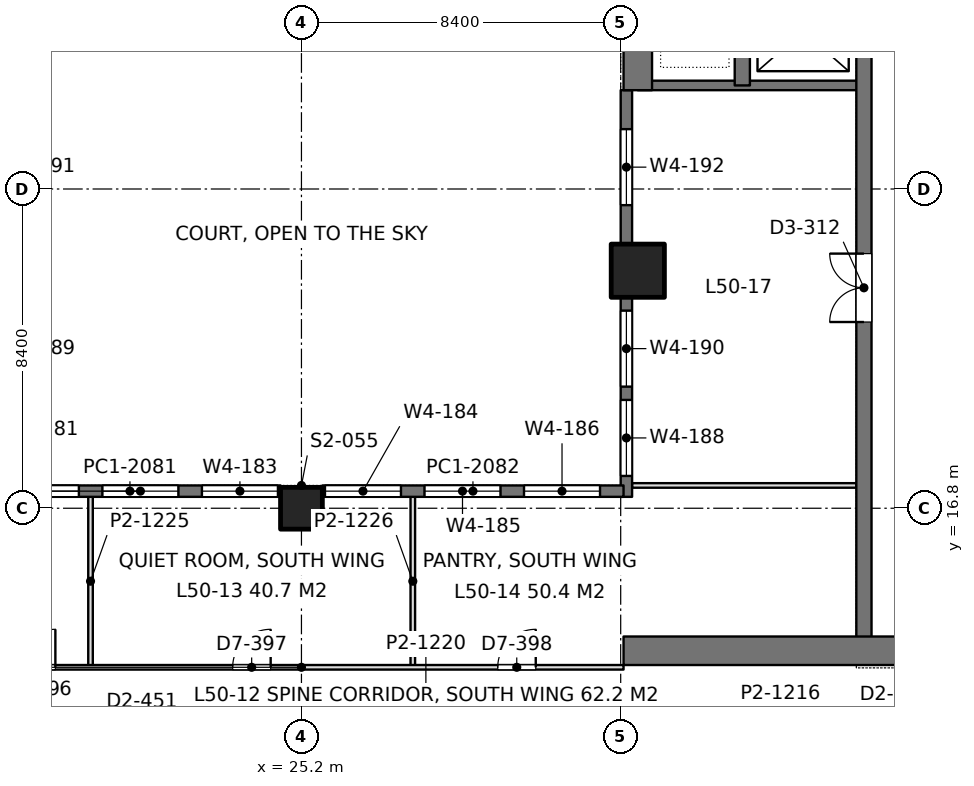
"""IFC4 building model, lengths in metres.
Left out: names, types, materials, properties, quantities, classifications, styles, units other than length and angle.
Written with IfcOpenShell. Run it as: python <this file> out.ifc"""

import sys

from ifc_helpers import new_model, si_unit, direction, frame, frame_2d, origin, origin_2d, place, context, subcontext, project, spatial, rectangle, extrude, element, fill, save


model = new_model("IFC4")
c1 = context("Model", 3, precision=1e-05, world=origin(), true_north=direction((0.0, 1.0)))
c2 = subcontext(c1, "Body", "Model", "MODEL_VIEW")
j1 = project(units=[si_unit("LENGTHUNIT", "METRE"), si_unit("PLANEANGLEUNIT", "RADIAN")], contexts=[c1])
p1 = place(None, origin())
s1 = spatial("IfcSite", under=j1, at=p1, CompositionType="ELEMENT")
p2 = place(p1, origin())
s2 = spatial("IfcBuilding", under=s1, at=p2, CompositionType="ELEMENT")
p3 = place(p2, frame((0.0, 0.0, 219.6)))
s3 = spatial("IfcBuildingStorey", under=s2, at=p3, CompositionType="ELEMENT", Elevation=219.6)
p4 = place(p3, frame((25.2, 16.8, 0.0), z_axis=(0.0, 0.0, 1.0), x_axis=(1.0, 0.0, 0.0)))
e1 = element("IfcColumn", 1, at=p4, inside=s3, PredefinedType="COLUMN", context=c2, shape_type="SweptSolid", body=[
    extrude(rectangle(XDim=1.1, YDim=1.1, at=origin_2d()), origin(), (0.0, 0.0, 1.0), 4.2),
])
p5 = place(p3, frame((34.05, 23.05, 0.0), z_axis=(0.0, 0.0, 1.0), x_axis=(1.0, 0.0, 0.0)))
e2 = element("IfcColumn", 2, at=p5, inside=s3, PredefinedType="COLUMN", context=c2, shape_type="SweptSolid", body=[
    extrude(rectangle(XDim=1.4, YDim=1.4, at=origin_2d()), origin(), (0.0, 0.0, 1.0), 4.2),
])
p6 = place(p3, frame((33.675, 13.05, 0.0), z_axis=(0.0, 0.0, 1.0), x_axis=(1.0, 0.0, 0.0)))
e3 = element("IfcWall", 3, at=p6, inside=s3, PredefinedType="SHEAR", context=c2, shape_type="SweptSolid", body=[
    extrude(rectangle(XDim=17.85, YDim=0.75, at=frame_2d((8.925, 0.0))), origin(), (0.0, 0.0, 1.0), 4.2),
])
p7 = place(p6, frame((7.175, 0.0, 0.0)))
e4 = element("IfcOpeningElement", 4, at=p7, cuts=e3, PredefinedType="OPENING", context=c2, shape_type="SweptSolid", body=[
    extrude(rectangle(XDim=1.8, YDim=2.4, at=frame_2d((0.9, 1.2))), frame((0.0, 0.385, 0.0), z_axis=(0.0, -1.0, 0.0), x_axis=(1.0, 0.0, 0.0)), (0.0, 0.0, 1.0), 0.77),
])
p8 = place(p3, frame((34.05, 27.8, 0.0), z_axis=(0.0, 0.0, 1.0), x_axis=(0.0, 1.0, 0.0)))
e5 = element("IfcWall", 5, at=p8, inside=s3, PredefinedType="SHEAR", context=c2, shape_type="SweptSolid", body=[
    extrude(rectangle(XDim=9.55, YDim=0.75, at=frame_2d((4.775, 0.0))), origin(), (0.0, 0.0, 1.0), 4.2),
])
p9 = place(p3, frame((40.0, 13.05, 0.0), z_axis=(0.0, 0.0, 1.0), x_axis=(0.0, 1.0, 0.0)))
e6 = element("IfcWall", 6, at=p9, inside=s3, PredefinedType="SHEAR", context=c2, shape_type="SweptSolid", body=[
    extrude(rectangle(XDim=24.3, YDim=0.4, at=frame_2d((12.15, 0.0))), origin(), (0.0, 0.0, 1.0), 4.2),
])
p10 = place(p9, frame((15.75, 0.0, 0.0)))
e7 = element("IfcOpeningElement", 7, at=p10, cuts=e6, PredefinedType="OPENING", context=c2, shape_type="SweptSolid", body=[
    extrude(rectangle(XDim=1.1, YDim=2.2, at=frame_2d((0.55, 1.1))), frame((0.0, 0.21, 0.0), z_axis=(0.0, -1.0, 0.0), x_axis=(1.0, 0.0, 0.0)), (0.0, 0.0, 1.0), 0.42),
])
p11 = place(p9, frame((18.6, 0.0, 0.0)))
e8 = element("IfcOpeningElement", 8, at=p11, cuts=e6, PredefinedType="OPENING", context=c2, shape_type="SweptSolid", body=[
    extrude(rectangle(XDim=1.1, YDim=2.2, at=frame_2d((0.55, 1.1))), frame((0.0, 0.21, 0.0), z_axis=(0.0, -1.0, 0.0), x_axis=(1.0, 0.0, 0.0)), (0.0, 0.0, 1.0), 0.42),
])
p12 = place(p9, frame((21.45, 0.0, 0.0)))
e9 = element("IfcOpeningElement", 9, at=p12, cuts=e6, PredefinedType="OPENING", context=c2, shape_type="SweptSolid", body=[
    extrude(rectangle(XDim=1.1, YDim=2.2, at=frame_2d((0.55, 1.1))), frame((0.0, 0.21, 0.0), z_axis=(0.0, -1.0, 0.0), x_axis=(1.0, 0.0, 0.0)), (0.0, 0.0, 1.0), 0.42),
])
p13 = place(p9, frame((8.65, 0.0, 0.0)))
e10 = element("IfcOpeningElement", 10, at=p13, cuts=e6, PredefinedType="OPENING", context=c2, shape_type="SweptSolid", body=[
    extrude(rectangle(XDim=1.8, YDim=2.4, at=frame_2d((0.9, 1.2))), frame((0.0, 0.21, 0.0), z_axis=(0.0, -1.0, 0.0), x_axis=(1.0, 0.0, 0.0)), (0.0, 0.0, 1.0), 0.42),
])
p14 = place(p3, frame((36.8, 27.925, 0.0), z_axis=(0.0, 0.0, 1.0), x_axis=(0.0, 1.0, 0.0)))
e11 = element("IfcWall", 11, at=p14, inside=s3, PredefinedType="SHEAR", context=c2, shape_type="SweptSolid", body=[
    extrude(rectangle(XDim=9.425, YDim=0.4, at=frame_2d((4.712, 0.0))), origin(), (0.0, 0.0, 1.0), 4.2),
])
p15 = place(p3, frame((40.0, 27.925, 0.0), z_axis=(0.0, 0.0, 1.0), x_axis=(-1.0, 0.0, 0.0)))
e12 = element("IfcWall", 12, at=p15, inside=s3, PredefinedType="SHEAR", context=c2, shape_type="SweptSolid", body=[
    extrude(rectangle(XDim=5.95, YDim=0.25, at=frame_2d((2.975, 0.0))), origin(), (0.0, 0.0, 1.0), 4.2),
])
p16 = place(p3, frame((33.75, 17.1, 0.0), z_axis=(0.0, 0.0, 1.0), x_axis=(0.0, 1.0, 0.0)))
e13 = element("IfcWall", 13, at=p16, inside=s3, PredefinedType="SOLIDWALL", context=c2, shape_type="SweptSolid", body=[
    extrude(rectangle(XDim=10.7, YDim=0.3, at=frame_2d((5.35, 0.0))), origin(), (0.0, 0.0, 1.0), 4.05),
])
p17 = place(p16, frame((0.55, 0.0, 0.9)))
e14 = element("IfcOpeningElement", 14, at=p17, cuts=e13, PredefinedType="OPENING", context=c2, shape_type="SweptSolid", body=[
    extrude(rectangle(XDim=2.0, YDim=1.9, at=frame_2d((1.0, 0.95))), frame((0.0, 0.16, 0.0), z_axis=(0.0, -1.0, 0.0), x_axis=(1.0, 0.0, 0.0)), (0.0, 0.0, 1.0), 0.32),
])
p18 = place(p16, frame((2.9, 0.0, 0.9)))
e15 = element("IfcOpeningElement", 15, at=p18, cuts=e13, PredefinedType="OPENING", context=c2, shape_type="SweptSolid", body=[
    extrude(rectangle(XDim=2.0, YDim=1.9, at=frame_2d((1.0, 0.95))), frame((0.0, 0.16, 0.0), z_axis=(0.0, -1.0, 0.0), x_axis=(1.0, 0.0, 0.0)), (0.0, 0.0, 1.0), 0.32),
])
p19 = place(p16, frame((7.675, 0.0, 0.9)))
e16 = element("IfcOpeningElement", 16, at=p19, cuts=e13, PredefinedType="OPENING", context=c2, shape_type="SweptSolid", body=[
    extrude(rectangle(XDim=2.0, YDim=1.9, at=frame_2d((1.0, 0.95))), frame((0.0, 0.16, 0.0), z_axis=(0.0, -1.0, 0.0), x_axis=(1.0, 0.0, 0.0)), (0.0, 0.0, 1.0), 0.32),
])
p20 = place(p3, frame((16.725, 17.25, 0.0), z_axis=(0.0, 0.0, 1.0), x_axis=(1.0, 0.0, 0.0)))
e17 = element("IfcWall", 17, at=p20, inside=s3, PredefinedType="SOLIDWALL", context=c2, shape_type="SweptSolid", body=[
    extrude(rectangle(XDim=7.925, YDim=0.3, at=frame_2d((3.962, 0.0))), origin(), (0.0, 0.0, 1.0), 4.05),
])
p21 = place(p20, frame((0.619, 0.0, 0.9)))
e18 = element("IfcOpeningElement", 18, at=p21, cuts=e17, PredefinedType="OPENING", context=c2, shape_type="SweptSolid", body=[
    extrude(rectangle(XDim=2.0, YDim=1.9, at=frame_2d((1.0, 0.95))), frame((0.0, 0.16, 0.0), z_axis=(0.0, -1.0, 0.0), x_axis=(1.0, 0.0, 0.0)), (0.0, 0.0, 1.0), 0.32),
])
p22 = place(p20, frame((3.238, 0.0, 0.9)))
e19 = element("IfcOpeningElement", 19, at=p22, cuts=e17, PredefinedType="OPENING", context=c2, shape_type="SweptSolid", body=[
    extrude(rectangle(XDim=2.0, YDim=1.9, at=frame_2d((1.0, 0.95))), frame((0.0, 0.16, 0.0), z_axis=(0.0, -1.0, 0.0), x_axis=(1.0, 0.0, 0.0)), (0.0, 0.0, 1.0), 0.32),
])
p23 = place(p20, frame((5.856, 0.0, 0.9)))
e20 = element("IfcOpeningElement", 20, at=p23, cuts=e17, PredefinedType="OPENING", context=c2, shape_type="SweptSolid", body=[
    extrude(rectangle(XDim=2.0, YDim=1.9, at=frame_2d((1.0, 0.95))), frame((0.0, 0.16, 0.0), z_axis=(0.0, -1.0, 0.0), x_axis=(1.0, 0.0, 0.0)), (0.0, 0.0, 1.0), 0.32),
])
p24 = place(p3, frame((25.75, 17.25, 0.0), z_axis=(0.0, 0.0, 1.0), x_axis=(1.0, 0.0, 0.0)))
e21 = element("IfcWall", 21, at=p24, inside=s3, PredefinedType="SOLIDWALL", context=c2, shape_type="SweptSolid", body=[
    extrude(rectangle(XDim=7.925, YDim=0.3, at=frame_2d((3.962, 0.0))), origin(), (0.0, 0.0, 1.0), 4.05),
])
p25 = place(p24, frame((0.069, 0.0, 0.9)))
e22 = element("IfcOpeningElement", 22, at=p25, cuts=e21, PredefinedType="OPENING", context=c2, shape_type="SweptSolid", body=[
    extrude(rectangle(XDim=2.0, YDim=1.9, at=frame_2d((1.0, 0.95))), frame((0.0, 0.16, 0.0), z_axis=(0.0, -1.0, 0.0), x_axis=(1.0, 0.0, 0.0)), (0.0, 0.0, 1.0), 0.32),
])
p26 = place(p24, frame((2.688, 0.0, 0.9)))
e23 = element("IfcOpeningElement", 23, at=p26, cuts=e21, PredefinedType="OPENING", context=c2, shape_type="SweptSolid", body=[
    extrude(rectangle(XDim=2.0, YDim=1.9, at=frame_2d((1.0, 0.95))), frame((0.0, 0.16, 0.0), z_axis=(0.0, -1.0, 0.0), x_axis=(1.0, 0.0, 0.0)), (0.0, 0.0, 1.0), 0.32),
])
p27 = place(p24, frame((5.306, 0.0, 0.9)))
e24 = element("IfcOpeningElement", 24, at=p27, cuts=e21, PredefinedType="OPENING", context=c2, shape_type="SweptSolid", body=[
    extrude(rectangle(XDim=2.0, YDim=1.9, at=frame_2d((1.0, 0.95))), frame((0.0, 0.16, 0.0), z_axis=(0.0, -1.0, 0.0), x_axis=(1.0, 0.0, 0.0)), (0.0, 0.0, 1.0), 0.32),
])
p28 = place(p3, frame((33.898, 17.4, 0.0), z_axis=(0.0, 0.0, 1.0), x_axis=(1.0, 0.0, 0.0)))
e25 = element("IfcWall", 25, at=p28, inside=s3, PredefinedType="PARTITIONING", context=c2, shape_type="SweptSolid", body=[
    extrude(rectangle(XDim=5.904, YDim=0.12, at=frame_2d((2.952, 0.0))), origin(), (0.0, 0.0, 1.0), 3.55),
])
for number, where, z_axis, x_axis in (
    (26, (19.65, 12.658, 0.0), (0.0, 0.0, 1.0), (0.0, 1.0, 0.0)),
    (27, (28.13, 12.658, 0.0), (0.0, 0.0, 1.0), (0.0, 1.0, 0.0)),
):
    element("IfcWall", number, at=place(p3, frame(where, z_axis=z_axis, x_axis=x_axis)), inside=s3, PredefinedType="PARTITIONING", context=c2, shape_type="SweptSolid", body=[
        extrude(rectangle(XDim=4.444, YDim=0.12, at=frame_2d((2.222, 0.0))), origin(), (0.0, 0.0, 1.0), 3.36),
    ])
p29 = place(p3, frame((16.725, 12.615, 0.0), z_axis=(0.0, 0.0, 1.0), x_axis=(1.0, 0.0, 0.0)))
e28 = element("IfcWall", 28, at=p29, inside=s3, PredefinedType="PARTITIONING", context=c2, shape_type="SweptSolid", body=[
    extrude(rectangle(XDim=16.95, YDim=0.12, at=frame_2d((8.475, 0.0))), origin(), (0.0, 0.0, 1.0), 3.55),
])
p30 = place(p29, frame((1.0, 0.0, 0.0)))
e29 = element("IfcOpeningElement", 29, at=p30, cuts=e28, PredefinedType="OPENING", context=c2, shape_type="SweptSolid", body=[
    extrude(rectangle(XDim=1.0, YDim=2.4, at=frame_2d((0.5, 1.2))), frame((0.0, 0.07, 0.0), z_axis=(0.0, -1.0, 0.0), x_axis=(1.0, 0.0, 0.0)), (0.0, 0.0, 1.0), 0.14),
])
p31 = place(p29, frame((6.665, 0.0, 0.0)))
e30 = element("IfcOpeningElement", 30, at=p31, cuts=e28, PredefinedType="OPENING", context=c2, shape_type="SweptSolid", body=[
    extrude(rectangle(XDim=1.0, YDim=2.4, at=frame_2d((0.5, 1.2))), frame((0.0, 0.07, 0.0), z_axis=(0.0, -1.0, 0.0), x_axis=(1.0, 0.0, 0.0)), (0.0, 0.0, 1.0), 0.14),
])
p32 = place(p29, frame((13.64, 0.0, 0.0)))
e31 = element("IfcOpeningElement", 31, at=p32, cuts=e28, PredefinedType="OPENING", context=c2, shape_type="SweptSolid", body=[
    extrude(rectangle(XDim=1.0, YDim=2.4, at=frame_2d((0.5, 1.2))), frame((0.0, 0.07, 0.0), z_axis=(0.0, -1.0, 0.0), x_axis=(1.0, 0.0, 0.0)), (0.0, 0.0, 1.0), 0.14),
])
p33 = place(p17, origin())
e32 = element("IfcWindow", 32, at=p33, inside=s3, PartitioningType="SINGLE_PANEL", PredefinedType="WINDOW", context=c2, shape_type="SweptSolid", body=[
    extrude(rectangle(XDim=2.0, YDim=1.9, at=frame_2d((1.0, 0.95))), frame((0.0, 0.03, 0.0), z_axis=(0.0, -1.0, 0.0), x_axis=(1.0, 0.0, 0.0)), (0.0, 0.0, 1.0), 0.06),
])
fill(e14, e32)
p34 = place(p18, origin())
e33 = element("IfcWindow", 33, at=p34, inside=s3, PartitioningType="SINGLE_PANEL", PredefinedType="WINDOW", context=c2, shape_type="SweptSolid", body=[
    extrude(rectangle(XDim=2.0, YDim=1.9, at=frame_2d((1.0, 0.95))), frame((0.0, 0.03, 0.0), z_axis=(0.0, -1.0, 0.0), x_axis=(1.0, 0.0, 0.0)), (0.0, 0.0, 1.0), 0.06),
])
fill(e15, e33)
p35 = place(p19, origin())
e34 = element("IfcWindow", 34, at=p35, inside=s3, PartitioningType="SINGLE_PANEL", PredefinedType="WINDOW", context=c2, shape_type="SweptSolid", body=[
    extrude(rectangle(XDim=2.0, YDim=1.9, at=frame_2d((1.0, 0.95))), frame((0.0, 0.03, 0.0), z_axis=(0.0, -1.0, 0.0), x_axis=(1.0, 0.0, 0.0)), (0.0, 0.0, 1.0), 0.06),
])
fill(e16, e34)
p36 = place(p21, origin())
e35 = element("IfcWindow", 35, at=p36, inside=s3, PartitioningType="SINGLE_PANEL", PredefinedType="WINDOW", context=c2, shape_type="SweptSolid", body=[
    extrude(rectangle(XDim=2.0, YDim=1.9, at=frame_2d((1.0, 0.95))), frame((0.0, 0.03, 0.0), z_axis=(0.0, -1.0, 0.0), x_axis=(1.0, 0.0, 0.0)), (0.0, 0.0, 1.0), 0.06),
])
fill(e18, e35)
p37 = place(p22, origin())
e36 = element("IfcWindow", 36, at=p37, inside=s3, PartitioningType="SINGLE_PANEL", PredefinedType="WINDOW", context=c2, shape_type="SweptSolid", body=[
    extrude(rectangle(XDim=2.0, YDim=1.9, at=frame_2d((1.0, 0.95))), frame((0.0, 0.03, 0.0), z_axis=(0.0, -1.0, 0.0), x_axis=(1.0, 0.0, 0.0)), (0.0, 0.0, 1.0), 0.06),
])
fill(e19, e36)
p38 = place(p23, origin())
e37 = element("IfcWindow", 37, at=p38, inside=s3, PartitioningType="SINGLE_PANEL", PredefinedType="WINDOW", context=c2, shape_type="SweptSolid", body=[
    extrude(rectangle(XDim=2.0, YDim=1.9, at=frame_2d((1.0, 0.95))), frame((0.0, 0.03, 0.0), z_axis=(0.0, -1.0, 0.0), x_axis=(1.0, 0.0, 0.0)), (0.0, 0.0, 1.0), 0.06),
])
fill(e20, e37)
p39 = place(p25, origin())
e38 = element("IfcWindow", 38, at=p39, inside=s3, PartitioningType="SINGLE_PANEL", PredefinedType="WINDOW", context=c2, shape_type="SweptSolid", body=[
    extrude(rectangle(XDim=2.0, YDim=1.9, at=frame_2d((1.0, 0.95))), frame((0.0, 0.03, 0.0), z_axis=(0.0, -1.0, 0.0), x_axis=(1.0, 0.0, 0.0)), (0.0, 0.0, 1.0), 0.06),
])
fill(e22, e38)
p40 = place(p26, origin())
e39 = element("IfcWindow", 39, at=p40, inside=s3, PartitioningType="SINGLE_PANEL", PredefinedType="WINDOW", context=c2, shape_type="SweptSolid", body=[
    extrude(rectangle(XDim=2.0, YDim=1.9, at=frame_2d((1.0, 0.95))), frame((0.0, 0.03, 0.0), z_axis=(0.0, -1.0, 0.0), x_axis=(1.0, 0.0, 0.0)), (0.0, 0.0, 1.0), 0.06),
])
fill(e23, e39)
p41 = place(p27, origin())
e40 = element("IfcWindow", 40, at=p41, inside=s3, PartitioningType="SINGLE_PANEL", PredefinedType="WINDOW", context=c2, shape_type="SweptSolid", body=[
    extrude(rectangle(XDim=2.0, YDim=1.9, at=frame_2d((1.0, 0.95))), frame((0.0, 0.03, 0.0), z_axis=(0.0, -1.0, 0.0), x_axis=(1.0, 0.0, 0.0)), (0.0, 0.0, 1.0), 0.06),
])
fill(e24, e40)
p42 = place(p13, origin())
e41 = element("IfcDoor", 41, at=p42, inside=s3, OperationType="DOUBLE_DOOR_SINGLE_SWING", PredefinedType="DOOR", context=c2, shape_type="SweptSolid", body=[
    extrude(rectangle(XDim=1.8, YDim=2.4, at=frame_2d((0.9, 1.2))), frame((0.0, 0.025, 0.0), z_axis=(0.0, -1.0, 0.0), x_axis=(1.0, 0.0, 0.0)), (0.0, 0.0, 1.0), 0.05),
])
fill(e10, e41)
p43 = place(p30, origin())
e42 = element("IfcDoor", 42, at=p43, inside=s3, OperationType="SINGLE_SWING_RIGHT", PredefinedType="DOOR", context=c2, shape_type="SweptSolid", body=[
    extrude(rectangle(XDim=1.0, YDim=2.4, at=frame_2d((0.5, 1.2))), frame((0.0, 0.025, 0.0), z_axis=(0.0, -1.0, 0.0), x_axis=(1.0, 0.0, 0.0)), (0.0, 0.0, 1.0), 0.05),
])
fill(e29, e42)
p44 = place(p31, origin())
e43 = element("IfcDoor", 43, at=p44, inside=s3, OperationType="SINGLE_SWING_RIGHT", PredefinedType="DOOR", context=c2, shape_type="SweptSolid", body=[
    extrude(rectangle(XDim=1.0, YDim=2.4, at=frame_2d((0.5, 1.2))), frame((0.0, 0.025, 0.0), z_axis=(0.0, -1.0, 0.0), x_axis=(1.0, 0.0, 0.0)), (0.0, 0.0, 1.0), 0.05),
])
fill(e30, e43)
p45 = place(p32, origin())
e44 = element("IfcDoor", 44, at=p45, inside=s3, OperationType="SINGLE_SWING_RIGHT", PredefinedType="DOOR", context=c2, shape_type="SweptSolid", body=[
    extrude(rectangle(XDim=1.0, YDim=2.4, at=frame_2d((0.5, 1.2))), frame((0.0, 0.025, 0.0), z_axis=(0.0, -1.0, 0.0), x_axis=(1.0, 0.0, 0.0)), (0.0, 0.0, 1.0), 0.05),
])
fill(e31, e44)
save(model, sys.argv[1])
